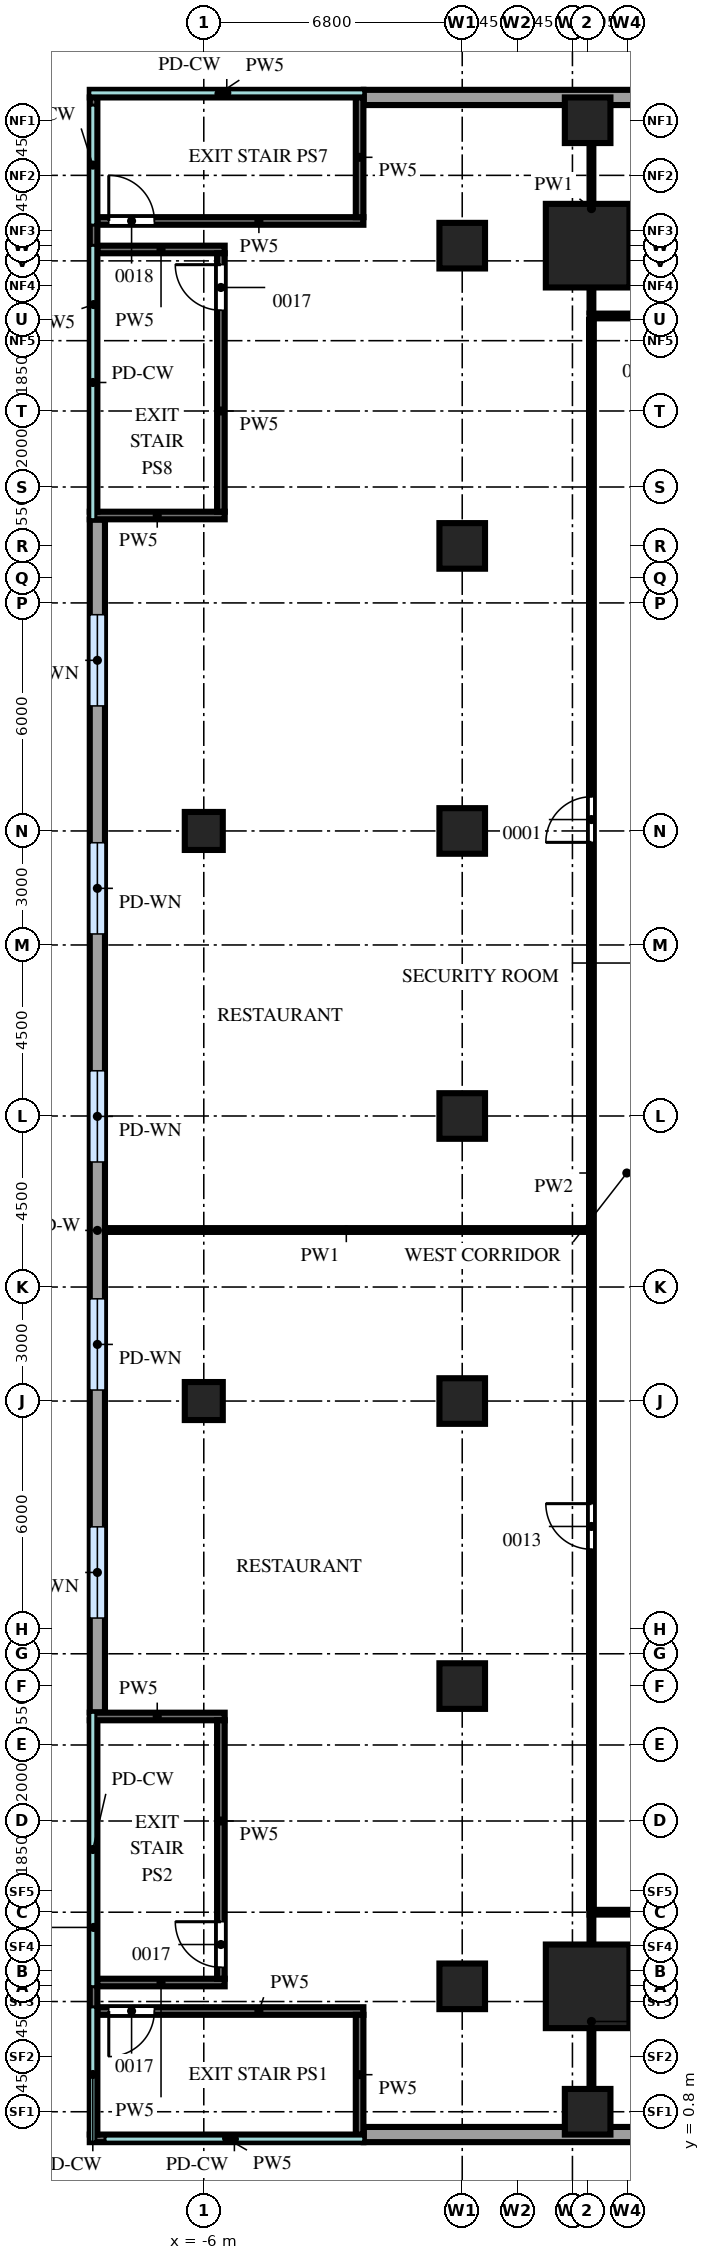
"""IFC4 building model, lengths in metres.
Left out: names, types, materials, properties, quantities, classifications, styles, units other than length and angle.
Written with IfcOpenShell. Run it as: python <this file> out.ifc"""

import sys

from ifc_helpers import new_model, si_unit, direction, frame, frame_2d, origin, origin_2d, place, context, subcontext, project, spatial, rectangle, extrude, source, transform, mapped, element, fill, save


model = new_model("IFC4")
c1 = context("Model", 3, precision=1e-05, world=origin(), true_north=direction((0.0, 1.0)))
c2 = subcontext(c1, "Body", "Model", "MODEL_VIEW")
j1 = project(units=[si_unit("LENGTHUNIT", "METRE"), si_unit("PLANEANGLEUNIT", "RADIAN")], contexts=[c1])
p1 = place(None, origin())
s1 = spatial("IfcSite", under=j1, at=p1, CompositionType="ELEMENT")
p2 = place(p1, origin())
s2 = spatial("IfcBuilding", under=s1, at=p2, CompositionType="ELEMENT")
p3 = place(p2, frame((0.0, 0.0, 18.5)))
s3 = spatial("IfcBuildingStorey", under=s2, at=p3, CompositionType="ELEMENT", Elevation=18.5)
m1 = source(origin(), c2, "Body", "SweptSolid", [
    extrude(rectangle(XDim=2.2, YDim=2.2, at=origin_2d()), origin(), (0.0, 0.0, 1.0), 4.7),
])
for number, where, z_axis, x_axis in (
    (1, (4.1, 49.9, 0.0), (0.0, 0.0, 1.0), (1.0, 0.0, 0.0)),
    (2, (4.1, 4.1, 0.0), (0.0, 0.0, 1.0), (1.0, 0.0, 0.0)),
):
    element("IfcColumn", number, at=place(p3, frame(where, z_axis=z_axis, x_axis=x_axis)), inside=s3, PredefinedType="COLUMN", context=c2, shape_type="MappedRepresentation", body=[
        mapped(m1, transform((0.0, 0.0, 0.0))),
    ])
m2 = source(origin(), c2, "Body", "SweptSolid", [
    extrude(rectangle(XDim=1.2, YDim=1.2, at=origin_2d()), origin(), (0.0, 0.0, 1.0), 4.7),
])
for number, where, z_axis, x_axis in (
    (3, (4.1, 0.8, 0.0), (0.0, 0.0, 1.0), (1.0, 0.0, 0.0)),
    (4, (4.1, 53.2, 0.0), (0.0, 0.0, 1.0), (1.0, 0.0, 0.0)),
    (5, (0.8, 4.1, 0.0), (0.0, 0.0, 1.0), (1.0, 0.0, 0.0)),
    (6, (0.8, 12.0, 0.0), (0.0, 0.0, 1.0), (1.0, 0.0, 0.0)),
    (7, (0.8, 19.5, 0.0), (0.0, 0.0, 1.0), (1.0, 0.0, 0.0)),
    (8, (0.8, 27.0, 0.0), (0.0, 0.0, 1.0), (1.0, 0.0, 0.0)),
    (9, (0.8, 34.5, 0.0), (0.0, 0.0, 1.0), (1.0, 0.0, 0.0)),
    (10, (0.8, 42.0, 0.0), (0.0, 0.0, 1.0), (1.0, 0.0, 0.0)),
    (11, (0.8, 49.9, 0.0), (0.0, 0.0, 1.0), (1.0, 0.0, 0.0)),
):
    element("IfcColumn", number, at=place(p3, frame(where, z_axis=z_axis, x_axis=x_axis)), inside=s3, PredefinedType="COLUMN", context=c2, shape_type="MappedRepresentation", body=[
        mapped(m2, transform((0.0, 0.0, 0.0))),
    ])
m3 = source(origin(), c2, "Body", "SweptSolid", [
    extrude(rectangle(XDim=1.0, YDim=1.0, at=origin_2d()), origin(), (0.0, 0.0, 1.0), 4.7),
])
for number, where, z_axis, x_axis in (
    (12, (-6.0, 19.5, 0.0), (0.0, 0.0, 1.0), (1.0, 0.0, 0.0)),
    (13, (-6.0, 34.5, 0.0), (0.0, 0.0, 1.0), (1.0, 0.0, 0.0)),
):
    element("IfcColumn", number, at=place(p3, frame(where, z_axis=z_axis, x_axis=x_axis)), inside=s3, PredefinedType="COLUMN", context=c2, shape_type="MappedRepresentation", body=[
        mapped(m3, transform((0.0, 0.0, 0.0))),
    ])
m4 = source(origin(), c2, "Body", "SweptSolid", [
    extrude(rectangle(XDim=31.38, YDim=0.4, at=frame_2d((15.69, 0.0))), origin(), (0.0, 0.0, 1.0), 4.7),
])
p4 = place(p3, frame((-8.8, 42.69, 0.0), z_axis=(0.0, 0.0, 1.0), x_axis=(0.0, -1.0, 0.0)))
e14 = element("IfcWall", 14, at=p4, inside=s3, PredefinedType="SOLIDWALL", context=c2, shape_type="MappedRepresentation", body=[
    mapped(m4, transform((0.0, 0.0, 0.0))),
])
m5 = source(origin(), c2, "Body", "SweptSolid", [
    extrude(rectangle(XDim=2.4, YDim=2.4, at=frame_2d((1.2, 1.2))), frame((0.0, 0.21, 0.0), z_axis=(0.0, -1.0, 0.0), x_axis=(1.0, 0.0, 0.0)), (0.0, 0.0, 1.0), 0.42),
])
p5 = place(p4, frame((2.5, 0.0, 1.0)))
e15 = element("IfcOpeningElement", 15, at=p5, cuts=e14, PredefinedType="OPENING", context=c2, shape_type="MappedRepresentation", body=[
    mapped(m5, transform((0.0, 0.0, 0.0))),
])
p6 = place(p4, frame((8.5, 0.0, 1.0)))
e16 = element("IfcOpeningElement", 16, at=p6, cuts=e14, PredefinedType="OPENING", context=c2, shape_type="MappedRepresentation", body=[
    mapped(m5, transform((0.0, 0.0, 0.0))),
])
p7 = place(p4, frame((14.5, 0.0, 1.0)))
e17 = element("IfcOpeningElement", 17, at=p7, cuts=e14, PredefinedType="OPENING", context=c2, shape_type="MappedRepresentation", body=[
    mapped(m5, transform((0.0, 0.0, 0.0))),
])
p8 = place(p4, frame((20.5, 0.0, 1.0)))
e18 = element("IfcOpeningElement", 18, at=p8, cuts=e14, PredefinedType="OPENING", context=c2, shape_type="MappedRepresentation", body=[
    mapped(m5, transform((0.0, 0.0, 0.0))),
])
p9 = place(p4, frame((26.5, 0.0, 1.0)))
e19 = element("IfcOpeningElement", 19, at=p9, cuts=e14, PredefinedType="OPENING", context=c2, shape_type="MappedRepresentation", body=[
    mapped(m5, transform((0.0, 0.0, 0.0))),
])
m6 = source(origin(), c2, "Body", "SweptSolid", [
    extrude(rectangle(XDim=32.44, YDim=0.4, at=frame_2d((16.22, 0.0))), origin(), (0.0, 0.0, 1.0), 4.7),
])
p10 = place(p3, frame((-1.79, 0.2, 0.0), z_axis=(0.0, 0.0, 1.0), x_axis=(1.0, 0.0, 0.0)))
e20 = element("IfcWall", 20, at=p10, inside=s3, PredefinedType="SOLIDWALL", context=c2, shape_type="MappedRepresentation", body=[
    mapped(m6, transform((0.0, 0.0, 0.0))),
])
p11 = place(p10, frame((9.0, 0.0, 1.0)))
e21 = element("IfcOpeningElement", 21, at=p11, cuts=e20, PredefinedType="OPENING", context=c2, shape_type="MappedRepresentation", body=[
    mapped(m5, transform((0.0, 0.0, 0.0))),
])
p12 = place(p10, frame((15.0, 0.0, 1.0)))
e22 = element("IfcOpeningElement", 22, at=p12, cuts=e20, PredefinedType="OPENING", context=c2, shape_type="MappedRepresentation", body=[
    mapped(m5, transform((0.0, 0.0, 0.0))),
])
m7 = source(origin(), c2, "Body", "SweptSolid", [
    extrude(rectangle(XDim=32.04, YDim=0.4, at=frame_2d((16.02, 0.0))), origin(), (0.0, 0.0, 1.0), 4.7),
])
p13 = place(p3, frame((30.25, 53.8, 0.0), z_axis=(0.0, 0.0, 1.0), x_axis=(-1.0, 0.0, 0.0)))
e23 = element("IfcWall", 23, at=p13, inside=s3, PredefinedType="SOLIDWALL", context=c2, shape_type="MappedRepresentation", body=[
    mapped(m7, transform((0.0, 0.0, 0.0))),
])
p14 = place(p13, frame((14.8, 0.0, 1.0)))
e24 = element("IfcOpeningElement", 24, at=p14, cuts=e23, PredefinedType="OPENING", context=c2, shape_type="MappedRepresentation", body=[
    mapped(m5, transform((0.0, 0.0, 0.0))),
])
p15 = place(p13, frame((20.8, 0.0, 1.0)))
e25 = element("IfcOpeningElement", 25, at=p15, cuts=e23, PredefinedType="OPENING", context=c2, shape_type="MappedRepresentation", body=[
    mapped(m5, transform((0.0, 0.0, 0.0))),
])
m8 = source(origin(), c2, "Body", "SweptSolid", [
    extrude(rectangle(XDim=7.2, YDim=0.2, at=frame_2d((3.6, 0.0))), origin(), (0.0, 0.0, 1.0), 4.7),
])
p16 = place(p3, frame((-9.0, 0.1, 0.0), z_axis=(0.0, 0.0, 1.0), x_axis=(1.0, 0.0, 0.0)))
e26 = element("IfcWall", 26, at=p16, inside=s3, PredefinedType="PARTITIONING", context=c2, shape_type="MappedRepresentation", body=[
    mapped(m8, transform((0.0, 0.0, 0.0))),
])
m9 = source(origin(), c2, "Body", "SweptSolid", [
    extrude(rectangle(XDim=7.0, YDim=0.2, at=frame_2d((3.5, 0.0))), origin(), (0.0, 0.0, 1.0), 4.7),
])
p17 = place(p3, frame((-8.8, 3.45, 0.0), z_axis=(0.0, 0.0, 1.0), x_axis=(1.0, 0.0, 0.0)))
e27 = element("IfcWall", 27, at=p17, inside=s3, PredefinedType="PARTITIONING", context=c2, shape_type="MappedRepresentation", body=[
    mapped(m9, transform((0.0, 0.0, 0.0))),
])
m10 = source(origin(), c2, "Body", "SweptSolid", [
    extrude(rectangle(XDim=1.2, YDim=2.1, at=frame_2d((0.6, 1.05))), frame((0.0, 0.11, 0.0), z_axis=(0.0, -1.0, 0.0), x_axis=(1.0, 0.0, 0.0)), (0.0, 0.0, 1.0), 0.22),
])
p18 = place(p17, frame((0.3, 0.0, 0.0)))
e28 = element("IfcOpeningElement", 28, at=p18, cuts=e27, PredefinedType="OPENING", context=c2, shape_type="MappedRepresentation", body=[
    mapped(m10, transform((0.0, 0.0, 0.0))),
])
m11 = source(origin(), c2, "Body", "SweptSolid", [
    extrude(rectangle(XDim=10.9, YDim=0.2, at=frame_2d((5.45, 0.0))), origin(), (0.0, 0.0, 1.0), 4.7),
])
p19 = place(p3, frame((-8.9, 0.2, 0.0), z_axis=(0.0, 0.0, 1.0), x_axis=(0.0, 1.0, 0.0)))
e29 = element("IfcWall", 29, at=p19, inside=s3, PredefinedType="PARTITIONING", context=c2, shape_type="MappedRepresentation", body=[
    mapped(m11, transform((0.0, 0.0, 0.0))),
])
m12 = source(origin(), c2, "Body", "SweptSolid", [
    extrude(rectangle(XDim=3.15, YDim=0.2, at=frame_2d((1.575, 0.0))), origin(), (0.0, 0.0, 1.0), 4.7),
])
p20 = place(p3, frame((-1.9, 0.2, 0.0), z_axis=(0.0, 0.0, 1.0), x_axis=(0.0, 1.0, 0.0)))
e30 = element("IfcWall", 30, at=p20, inside=s3, PredefinedType="PARTITIONING", context=c2, shape_type="MappedRepresentation", body=[
    mapped(m12, transform((0.0, 0.0, 0.0))),
])
m13 = source(origin(), c2, "Body", "SweptSolid", [
    extrude(rectangle(XDim=3.35, YDim=0.2, at=frame_2d((1.675, 0.0))), origin(), (0.0, 0.0, 1.0), 4.7),
])
p21 = place(p3, frame((-8.8, 4.2, 0.0), z_axis=(0.0, 0.0, 1.0), x_axis=(1.0, 0.0, 0.0)))
e31 = element("IfcWall", 31, at=p21, inside=s3, PredefinedType="PARTITIONING", context=c2, shape_type="MappedRepresentation", body=[
    mapped(m13, transform((0.0, 0.0, 0.0))),
])
m14 = source(origin(), c2, "Body", "SweptSolid", [
    extrude(rectangle(XDim=3.55, YDim=0.2, at=frame_2d((1.775, 0.0))), origin(), (0.0, 0.0, 1.0), 4.7),
])
p22 = place(p3, frame((-9.0, 11.2, 0.0), z_axis=(0.0, 0.0, 1.0), x_axis=(1.0, 0.0, 0.0)))
e32 = element("IfcWall", 32, at=p22, inside=s3, PredefinedType="PARTITIONING", context=c2, shape_type="MappedRepresentation", body=[
    mapped(m14, transform((0.0, 0.0, 0.0))),
])
m15 = source(origin(), c2, "Body", "SweptSolid", [
    extrude(rectangle(XDim=6.8, YDim=0.2, at=frame_2d((3.4, 0.0))), origin(), (0.0, 0.0, 1.0), 4.7),
])
p23 = place(p3, frame((-5.55, 4.3, 0.0), z_axis=(0.0, 0.0, 1.0), x_axis=(0.0, 1.0, 0.0)))
e33 = element("IfcWall", 33, at=p23, inside=s3, PredefinedType="PARTITIONING", context=c2, shape_type="MappedRepresentation", body=[
    mapped(m15, transform((0.0, 0.0, 0.0))),
])
p24 = place(p23, frame((0.3, 0.0, 0.0)))
e34 = element("IfcOpeningElement", 34, at=p24, cuts=e33, PredefinedType="OPENING", context=c2, shape_type="MappedRepresentation", body=[
    mapped(m10, transform((0.0, 0.0, 0.0))),
])
p25 = place(p3, frame((-8.8, 50.55, 0.0), z_axis=(0.0, 0.0, 1.0), x_axis=(1.0, 0.0, 0.0)))
e35 = element("IfcWall", 35, at=p25, inside=s3, PredefinedType="PARTITIONING", context=c2, shape_type="MappedRepresentation", body=[
    mapped(m9, transform((0.0, 0.0, 0.0))),
])
p26 = place(p25, frame((0.3, 0.0, 0.0)))
e36 = element("IfcOpeningElement", 36, at=p26, cuts=e35, PredefinedType="OPENING", context=c2, shape_type="MappedRepresentation", body=[
    mapped(m10, transform((0.0, 0.0, 0.0))),
])
p27 = place(p3, frame((-9.0, 53.9, 0.0), z_axis=(0.0, 0.0, 1.0), x_axis=(1.0, 0.0, 0.0)))
e37 = element("IfcWall", 37, at=p27, inside=s3, PredefinedType="PARTITIONING", context=c2, shape_type="MappedRepresentation", body=[
    mapped(m8, transform((0.0, 0.0, 0.0))),
])
p28 = place(p3, frame((-1.9, 50.65, 0.0), z_axis=(0.0, 0.0, 1.0), x_axis=(0.0, 1.0, 0.0)))
e38 = element("IfcWall", 38, at=p28, inside=s3, PredefinedType="PARTITIONING", context=c2, shape_type="MappedRepresentation", body=[
    mapped(m12, transform((0.0, 0.0, 0.0))),
])
p29 = place(p3, frame((-9.0, 42.8, 0.0), z_axis=(0.0, 0.0, 1.0), x_axis=(1.0, 0.0, 0.0)))
e39 = element("IfcWall", 39, at=p29, inside=s3, PredefinedType="PARTITIONING", context=c2, shape_type="MappedRepresentation", body=[
    mapped(m14, transform((0.0, 0.0, 0.0))),
])
p30 = place(p3, frame((-8.8, 49.8, 0.0), z_axis=(0.0, 0.0, 1.0), x_axis=(1.0, 0.0, 0.0)))
e40 = element("IfcWall", 40, at=p30, inside=s3, PredefinedType="PARTITIONING", context=c2, shape_type="MappedRepresentation", body=[
    mapped(m13, transform((0.0, 0.0, 0.0))),
])
p31 = place(p3, frame((-8.9, 42.9, 0.0), z_axis=(0.0, 0.0, 1.0), x_axis=(0.0, 1.0, 0.0)))
e41 = element("IfcWall", 41, at=p31, inside=s3, PredefinedType="PARTITIONING", context=c2, shape_type="MappedRepresentation", body=[
    mapped(m11, transform((0.0, 0.0, 0.0))),
])
p32 = place(p3, frame((-5.55, 42.9, 0.0), z_axis=(0.0, 0.0, 1.0), x_axis=(0.0, 1.0, 0.0)))
e42 = element("IfcWall", 42, at=p32, inside=s3, PredefinedType="PARTITIONING", context=c2, shape_type="MappedRepresentation", body=[
    mapped(m15, transform((0.0, 0.0, 0.0))),
])
p33 = place(p32, frame((5.3, 0.0, 0.0)))
e43 = element("IfcOpeningElement", 43, at=p33, cuts=e42, PredefinedType="OPENING", context=c2, shape_type="MappedRepresentation", body=[
    mapped(m10, transform((0.0, 0.0, 0.0))),
])
m16 = source(origin(), c2, "Body", "SweptSolid", [
    extrude(rectangle(XDim=5.55, YDim=0.1, at=frame_2d((2.775, 0.0))), origin(), (0.0, 0.0, 1.0), 4.7),
])
p34 = place(p3, frame((4.2, 0.4, 0.0), z_axis=(0.0, 0.0, 1.0), x_axis=(0.0, 1.0, 0.0)))
e44 = element("IfcWall", 44, at=p34, inside=s3, PredefinedType="PARTITIONING", context=c2, shape_type="MappedRepresentation", body=[
    mapped(m16, transform((0.0, 0.0, 0.0))),
])
m17 = source(origin(), c2, "Body", "SweptSolid", [
    extrude(rectangle(XDim=22.3, YDim=0.125, at=frame_2d((11.15, 0.0))), origin(), (0.0, 0.0, 1.0), 4.7),
])
p35 = place(p3, frame((4.15, 6.05, 0.0), z_axis=(0.0, 0.0, 1.0), x_axis=(1.0, 0.0, 0.0)))
e45 = element("IfcWall", 45, at=p35, inside=s3, PredefinedType="PARTITIONING", context=c2, shape_type="MappedRepresentation", body=[
    mapped(m17, transform((0.0, 0.0, 0.0))),
])
m18 = source(origin(), c2, "Body", "SweptSolid", [
    extrude(rectangle(XDim=1.2, YDim=2.1, at=frame_2d((0.6, 1.05))), frame((0.0, 0.073, 0.0), z_axis=(0.0, -1.0, 0.0), x_axis=(1.0, 0.0, 0.0)), (0.0, 0.0, 1.0), 0.145),
])
p36 = place(p35, frame((9.2, 0.0, 0.0)))
e46 = element("IfcOpeningElement", 46, at=p36, cuts=e45, PredefinedType="OPENING", context=c2, shape_type="MappedRepresentation", body=[
    mapped(m18, transform((0.0, 0.0, 0.0))),
])
m19 = source(origin(), c2, "Body", "SweptSolid", [
    extrude(rectangle(XDim=41.8, YDim=0.125, at=frame_2d((20.9, 0.0))), origin(), (0.0, 0.0, 1.0), 4.7),
])
p37 = place(p3, frame((4.2, 6.15, 0.0), z_axis=(0.0, 0.0, 1.0), x_axis=(0.0, 1.0, 0.0)))
e47 = element("IfcWall", 47, at=p37, inside=s3, PredefinedType="PARTITIONING", context=c2, shape_type="MappedRepresentation", body=[
    mapped(m19, transform((0.0, 0.0, 0.0))),
])
p38 = place(p37, frame((9.45, 0.0, 0.0)))
e48 = element("IfcOpeningElement", 48, at=p38, cuts=e47, PredefinedType="OPENING", context=c2, shape_type="MappedRepresentation", body=[
    mapped(m18, transform((0.0, 0.0, 0.0))),
])
p39 = place(p37, frame((28.05, 0.0, 0.0)))
e49 = element("IfcOpeningElement", 49, at=p39, cuts=e47, PredefinedType="OPENING", context=c2, shape_type="MappedRepresentation", body=[
    mapped(m18, transform((0.0, 0.0, 0.0))),
])
m20 = source(origin(), c2, "Body", "SweptSolid", [
    extrude(rectangle(XDim=12.7, YDim=0.1, at=frame_2d((6.35, 0.0))), origin(), (0.0, 0.0, 1.0), 4.7),
])
p40 = place(p3, frame((-8.6, 24.0, 0.0), z_axis=(0.0, 0.0, 1.0), x_axis=(1.0, 0.0, 0.0)))
e50 = element("IfcWall", 50, at=p40, inside=s3, PredefinedType="PARTITIONING", context=c2, shape_type="MappedRepresentation", body=[
    mapped(m20, transform((0.0, 0.0, 0.0))),
])
m21 = source(origin(), c2, "Body", "SweptSolid", [
    extrude(rectangle(XDim=26.1, YDim=0.125, at=frame_2d((13.05, 0.0))), origin(), (0.0, 0.0, 1.0), 4.7),
])
p41 = place(p3, frame((4.15, 48.05, 0.0), z_axis=(0.0, 0.0, 1.0), x_axis=(1.0, 0.0, 0.0)))
e51 = element("IfcWall", 51, at=p41, inside=s3, PredefinedType="PARTITIONING", context=c2, shape_type="MappedRepresentation", body=[
    mapped(m21, transform((0.0, 0.0, 0.0))),
])
m22 = source(origin(), c2, "Body", "SweptSolid", [
    extrude(rectangle(XDim=1.0, YDim=2.1, at=frame_2d((0.5, 1.05))), frame((0.0, 0.073, 0.0), z_axis=(0.0, -1.0, 0.0), x_axis=(1.0, 0.0, 0.0)), (0.0, 0.0, 1.0), 0.145),
])
p42 = place(p41, frame((1.6, 0.0, 0.0)))
e52 = element("IfcOpeningElement", 52, at=p42, cuts=e51, PredefinedType="OPENING", context=c2, shape_type="MappedRepresentation", body=[
    mapped(m22, transform((0.0, 0.0, 0.0))),
])
m23 = source(origin(), c2, "Body", "SweptSolid", [
    extrude(rectangle(XDim=0.9, YDim=2.1, at=frame_2d((0.45, 1.05))), frame((0.0, 0.073, 0.0), z_axis=(0.0, -1.0, 0.0), x_axis=(1.0, 0.0, 0.0)), (0.0, 0.0, 1.0), 0.145),
])
p43 = place(p41, frame((6.7, 0.0, 0.0)))
e53 = element("IfcOpeningElement", 53, at=p43, cuts=e51, PredefinedType="OPENING", context=c2, shape_type="MappedRepresentation", body=[
    mapped(m23, transform((0.0, 0.0, 0.0))),
])
p44 = place(p41, frame((18.6, 0.0, 0.0)))
e54 = element("IfcOpeningElement", 54, at=p44, cuts=e51, PredefinedType="OPENING", context=c2, shape_type="MappedRepresentation", body=[
    mapped(m23, transform((0.0, 0.0, 0.0))),
])
m24 = source(origin(), c2, "Body", "SweptSolid", [
    extrude(rectangle(XDim=5.45, YDim=0.1, at=frame_2d((2.725, 0.0))), origin(), (0.0, 0.0, 1.0), 4.7),
])
p45 = place(p3, frame((4.2, 48.15, 0.0), z_axis=(0.0, 0.0, 1.0), x_axis=(0.0, 1.0, 0.0)))
e55 = element("IfcWall", 55, at=p45, inside=s3, PredefinedType="PARTITIONING", context=c2, shape_type="MappedRepresentation", body=[
    mapped(m24, transform((0.0, 0.0, 0.0))),
])
m25 = source(origin(), c2, "Body", "SweptSolid", [
    extrude(rectangle(XDim=2.4, YDim=2.4, at=frame_2d((1.2, 1.2))), frame((0.0, 0.03, 0.0), z_axis=(0.0, -1.0, 0.0), x_axis=(1.0, 0.0, 0.0)), (0.0, 0.0, 1.0), 0.06),
])
p46 = place(p5, origin())
e56 = element("IfcWindow", 56, at=p46, inside=s3, PartitioningType="SINGLE_PANEL", PredefinedType="WINDOW", context=c2, shape_type="MappedRepresentation", body=[
    mapped(m25, transform((0.0, 0.0, 0.0))),
])
fill(e15, e56)
p47 = place(p6, origin())
e57 = element("IfcWindow", 57, at=p47, inside=s3, PartitioningType="SINGLE_PANEL", PredefinedType="WINDOW", context=c2, shape_type="MappedRepresentation", body=[
    mapped(m25, transform((0.0, 0.0, 0.0))),
])
fill(e16, e57)
p48 = place(p7, origin())
e58 = element("IfcWindow", 58, at=p48, inside=s3, PartitioningType="SINGLE_PANEL", PredefinedType="WINDOW", context=c2, shape_type="MappedRepresentation", body=[
    mapped(m25, transform((0.0, 0.0, 0.0))),
])
fill(e17, e58)
p49 = place(p8, origin())
e59 = element("IfcWindow", 59, at=p49, inside=s3, PartitioningType="SINGLE_PANEL", PredefinedType="WINDOW", context=c2, shape_type="MappedRepresentation", body=[
    mapped(m25, transform((0.0, 0.0, 0.0))),
])
fill(e18, e59)
p50 = place(p9, origin())
e60 = element("IfcWindow", 60, at=p50, inside=s3, PartitioningType="SINGLE_PANEL", PredefinedType="WINDOW", context=c2, shape_type="MappedRepresentation", body=[
    mapped(m25, transform((0.0, 0.0, 0.0))),
])
fill(e19, e60)
m26 = source(origin(), c2, "Body", "SweptSolid", [
    extrude(rectangle(XDim=1.2, YDim=2.1, at=frame_2d((0.6, 1.05))), frame((0.0, 0.025, 0.0), z_axis=(0.0, -1.0, 0.0), x_axis=(1.0, 0.0, 0.0)), (0.0, 0.0, 1.0), 0.05),
])
p51 = place(p38, origin())
e61 = element("IfcDoor", 61, at=p51, inside=s3, OperationType="SINGLE_SWING_LEFT", PredefinedType="DOOR", context=c2, shape_type="MappedRepresentation", body=[
    mapped(m26, transform((0.0, 0.0, 0.0))),
])
fill(e48, e61)
p52 = place(p39, origin())
e62 = element("IfcDoor", 62, at=p52, inside=s3, OperationType="SINGLE_SWING_RIGHT", PredefinedType="DOOR", context=c2, shape_type="MappedRepresentation", body=[
    mapped(m26, transform((0.0, 0.0, 0.0))),
])
fill(e49, e62)
p53 = place(p18, origin())
e63 = element("IfcDoor", 63, at=p53, inside=s3, OperationType="SINGLE_SWING_LEFT", PredefinedType="DOOR", context=c2, shape_type="MappedRepresentation", body=[
    mapped(m26, transform((0.0, 0.0, 0.0))),
])
fill(e28, e63)
p54 = place(p24, origin())
e64 = element("IfcDoor", 64, at=p54, inside=s3, OperationType="SINGLE_SWING_LEFT", PredefinedType="DOOR", context=c2, shape_type="MappedRepresentation", body=[
    mapped(m26, transform((0.0, 0.0, 0.0))),
])
fill(e34, e64)
p55 = place(p26, origin())
e65 = element("IfcDoor", 65, at=p55, inside=s3, OperationType="SINGLE_SWING_RIGHT", PredefinedType="DOOR", context=c2, shape_type="MappedRepresentation", body=[
    mapped(m26, transform((0.0, 0.0, 0.0))),
])
fill(e36, e65)
p56 = place(p33, origin())
e66 = element("IfcDoor", 66, at=p56, inside=s3, OperationType="SINGLE_SWING_LEFT", PredefinedType="DOOR", context=c2, shape_type="MappedRepresentation", body=[
    mapped(m26, transform((0.0, 0.0, 0.0))),
])
fill(e43, e66)
save(model, sys.argv[1])
